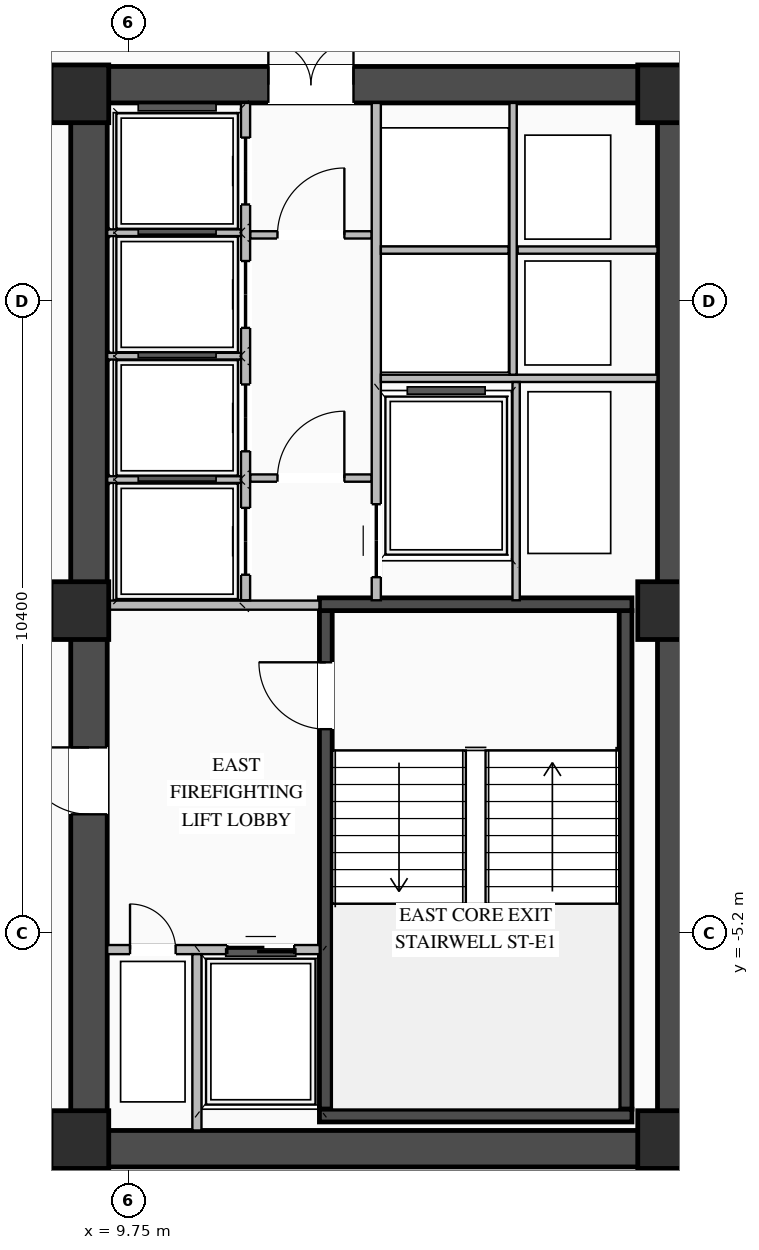
"""IFC4 building model, lengths in metres.
Left out: names, types, materials, properties, quantities, classifications, styles, units other than length and angle.
Written with IfcOpenShell. Run it as: python <this file> out.ifc"""

import sys

from ifc_helpers import new_model, si_unit, direction, frame, frame_2d, origin, origin_2d, place, context, subcontext, project, spatial, rectangle, extrude, element, fill, save


model = new_model("IFC4")
c1 = context("Model", 3, precision=1e-05, world=origin(), true_north=direction((0.0, 1.0)))
c2 = subcontext(c1, "Body", "Model", "MODEL_VIEW")
j1 = project(units=[si_unit("LENGTHUNIT", "METRE"), si_unit("PLANEANGLEUNIT", "RADIAN")], contexts=[c1])
p1 = place(None, origin())
s1 = spatial("IfcSite", under=j1, at=p1, CompositionType="ELEMENT")
p2 = place(p1, origin())
s2 = spatial("IfcBuilding", under=s1, at=p2, CompositionType="ELEMENT")
p3 = place(p2, frame((0.0, 0.0, 141.55)))
s3 = spatial("IfcBuildingStorey", under=s2, at=p3, CompositionType="ELEMENT", Elevation=141.55)
p4 = place(p3, frame((8.8, -8.75, 0.0), z_axis=(0.0, 0.0, 1.0), x_axis=(1.0, 0.0, 0.0)))
e1 = element("IfcWall", 1, at=p4, inside=s3, PredefinedType="SHEAR", context=c2, shape_type="SweptSolid", body=[
    extrude(rectangle(XDim=10.25, YDim=0.6, at=frame_2d((5.125, 0.0))), origin(), (0.0, 0.0, 1.0), 3.27),
])
p5 = place(p3, frame((8.8, 8.75, 0.0), z_axis=(0.0, 0.0, 1.0), x_axis=(1.0, 0.0, 0.0)))
e2 = element("IfcWall", 2, at=p5, inside=s3, PredefinedType="SHEAR", context=c2, shape_type="SweptSolid", body=[
    extrude(rectangle(XDim=10.25, YDim=0.6, at=frame_2d((5.125, 0.0))), origin(), (0.0, 0.0, 1.0), 3.27),
])
p6 = place(p5, frame((3.25, 0.0, 0.0)))
e3 = element("IfcOpeningElement", 3, at=p6, cuts=e2, PredefinedType="OPENING", context=c2, shape_type="SweptSolid", body=[
    extrude(rectangle(XDim=1.4, YDim=2.05, at=frame_2d((0.7, 1.025))), frame((0.0, 0.31, 0.0), z_axis=(0.0, -1.0, 0.0), x_axis=(1.0, 0.0, 0.0)), (0.0, 0.0, 1.0), 0.62),
])
p7 = place(p3, frame((9.1, -8.45, 0.0), z_axis=(0.0, 0.0, 1.0), x_axis=(0.0, 1.0, 0.0)))
e4 = element("IfcWall", 4, at=p7, inside=s3, PredefinedType="SHEAR", context=c2, shape_type="SweptSolid", body=[
    extrude(rectangle(XDim=16.9, YDim=0.6, at=frame_2d((8.45, 0.0))), origin(), (0.0, 0.0, 1.0), 3.27),
])
p8 = place(p7, frame((5.2, 0.0, 0.0)))
e5 = element("IfcOpeningElement", 5, at=p8, cuts=e4, PredefinedType="OPENING", context=c2, shape_type="SweptSolid", body=[
    extrude(rectangle(XDim=1.1, YDim=2.08, at=frame_2d((0.55, 1.04))), frame((0.0, 0.31, 0.0), z_axis=(0.0, -1.0, 0.0), x_axis=(1.0, 0.0, 0.0)), (0.0, 0.0, 1.0), 0.62),
])
p9 = place(p3, frame((18.75, -8.45, 0.0), z_axis=(0.0, 0.0, 1.0), x_axis=(0.0, 1.0, 0.0)))
e6 = element("IfcWall", 6, at=p9, inside=s3, PredefinedType="SHEAR", context=c2, shape_type="SweptSolid", body=[
    extrude(rectangle(XDim=16.9, YDim=0.6, at=frame_2d((8.45, 0.0))), origin(), (0.0, 0.0, 1.0), 3.27),
])
p10 = place(p3, frame((12.995, -8.1, 0.0), z_axis=(0.0, 0.0, 1.0), x_axis=(0.0, 1.0, 0.0)))
e7 = element("IfcWall", 7, at=p10, inside=s3, PredefinedType="SHEAR", context=c2, shape_type="SweptSolid", body=[
    extrude(rectangle(XDim=8.2, YDim=0.21, at=frame_2d((4.1, 0.0))), origin(), (0.0, 0.0, 1.0), 3.27),
])
p11 = place(p10, frame((6.25, 0.0, 0.0)))
e8 = element("IfcOpeningElement", 8, at=p11, cuts=e7, PredefinedType="OPENING", context=c2, shape_type="SweptSolid", body=[
    extrude(rectangle(XDim=1.1, YDim=2.15, at=frame_2d((0.55, 1.075))), frame((0.0, 0.115, 0.0), z_axis=(0.0, -1.0, 0.0), x_axis=(1.0, 0.0, 0.0)), (0.0, 0.0, 1.0), 0.23),
])
p12 = place(p3, frame((17.925, -8.1, 0.0), z_axis=(0.0, 0.0, 1.0), x_axis=(0.0, 1.0, 0.0)))
e9 = element("IfcWall", 9, at=p12, inside=s3, PredefinedType="SHEAR", context=c2, shape_type="SweptSolid", body=[
    extrude(rectangle(XDim=8.2, YDim=0.21, at=frame_2d((4.1, 0.0))), origin(), (0.0, 0.0, 1.0), 3.27),
])
for number, where, z_axis, x_axis in (
    (10, (12.89, -8.205, 0.0), (0.0, 0.0, 1.0), (1.0, 0.0, 0.0)),
    (11, (18.03, 0.205, 0.0), (0.0, 0.0, 1.0), (-1.0, 0.0, 0.0)),
):
    element("IfcWall", number, at=place(p3, frame(where, z_axis=z_axis, x_axis=x_axis)), inside=s3, PredefinedType="SHEAR", context=c2, shape_type="SweptSolid", body=[
        extrude(rectangle(XDim=5.14, YDim=0.21, at=frame_2d((2.57, 0.0))), origin(), (0.0, 0.0, 1.0), 3.27),
    ])
for number, where, z_axis, x_axis in (
    (12, (8.95, -8.6, 0.0), (0.0, 0.0, 1.0), (1.0, 0.0, 0.0)),
    (13, (8.95, 0.1, 0.0), (0.0, 0.0, 1.0), (1.0, 0.0, 0.0)),
    (14, (8.95, 8.6, 0.0), (0.0, 0.0, 1.0), (1.0, 0.0, 0.0)),
    (15, (18.6, -8.6, 0.0), (0.0, 0.0, 1.0), (1.0, 0.0, 0.0)),
    (16, (18.6, 0.1, 0.0), (0.0, 0.0, 1.0), (1.0, 0.0, 0.0)),
    (17, (18.6, 8.6, 0.0), (0.0, 0.0, 1.0), (1.0, 0.0, 0.0)),
):
    element("IfcColumn", number, at=place(p3, frame(where, z_axis=z_axis, x_axis=x_axis)), inside=s3, PredefinedType="COLUMN", context=c2, shape_type="SweptSolid", body=[
        extrude(rectangle(XDim=0.95, YDim=0.95, at=origin_2d()), origin(), (0.0, 0.0, 1.0), 3.45),
    ])
p13 = place(p3, frame((9.4, -5.475, 0.0), z_axis=(0.0, 0.0, 1.0), x_axis=(1.0, 0.0, 0.0)))
e18 = element("IfcWall", 18, at=p13, inside=s3, PredefinedType="STANDARD", context=c2, shape_type="SweptSolid", body=[
    extrude(rectangle(XDim=3.495, YDim=0.15, at=frame_2d((1.748, 0.0))), origin(), (0.0, 0.0, 1.0), 3.25),
])
p14 = place(p13, frame((1.975, 0.0, 0.0)))
e19 = element("IfcOpeningElement", 19, at=p14, cuts=e18, PredefinedType="OPENING", context=c2, shape_type="SweptSolid", body=[
    extrude(rectangle(XDim=1.1, YDim=2.15, at=frame_2d((0.55, 1.075))), frame((0.0, 0.085, 0.0), z_axis=(0.0, -1.0, 0.0), x_axis=(1.0, 0.0, 0.0)), (0.0, 0.0, 1.0), 0.17),
])
p15 = place(p13, frame((0.375, 0.0, 0.0)))
e20 = element("IfcOpeningElement", 20, at=p15, cuts=e18, PredefinedType="OPENING", context=c2, shape_type="SweptSolid", body=[
    extrude(rectangle(XDim=0.75, YDim=2.05, at=frame_2d((0.375, 1.025))), frame((0.0, 0.085, 0.0), z_axis=(0.0, -1.0, 0.0), x_axis=(1.0, 0.0, 0.0)), (0.0, 0.0, 1.0), 0.17),
])
p16 = place(p3, frame((10.875, -8.45, 0.0), z_axis=(0.0, 0.0, 1.0), x_axis=(0.0, 1.0, 0.0)))
e21 = element("IfcWall", 21, at=p16, inside=s3, PredefinedType="STANDARD", context=c2, shape_type="SweptSolid", body=[
    extrude(rectangle(XDim=2.9, YDim=0.15, at=frame_2d((1.45, 0.0))), origin(), (0.0, 0.0, 1.0), 3.25),
])
p17 = place(p3, frame((9.4, 0.19, 0.0), z_axis=(0.0, 0.0, 1.0), x_axis=(1.0, 0.0, 0.0)))
e22 = element("IfcWall", 22, at=p17, inside=s3, PredefinedType="STANDARD", context=c2, shape_type="SweptSolid", body=[
    extrude(rectangle(XDim=3.49, YDim=0.15, at=frame_2d((1.745, 0.0))), origin(), (0.0, 0.0, 1.0), 2.645),
])
p18 = place(p3, frame((11.75, 2.28, 0.0), z_axis=(0.0, 0.0, 1.0), x_axis=(1.0, 0.0, 0.0)))
e23 = element("IfcWall", 23, at=p18, inside=s3, PredefinedType="STANDARD", context=c2, shape_type="SweptSolid", body=[
    extrude(rectangle(XDim=2.0, YDim=0.12, at=frame_2d((1.0, 0.0))), origin(), (0.0, 0.0, 1.0), 3.25),
])
p19 = place(p18, frame((0.45, 0.0, 0.0)))
e24 = element("IfcOpeningElement", 24, at=p19, cuts=e23, PredefinedType="OPENING", context=c2, shape_type="SweptSolid", body=[
    extrude(rectangle(XDim=1.1, YDim=2.1, at=frame_2d((0.55, 1.05))), frame((0.0, 0.07, 0.0), z_axis=(0.0, -1.0, 0.0), x_axis=(1.0, 0.0, 0.0)), (0.0, 0.0, 1.0), 0.14),
])
p20 = place(p3, frame((11.75, 6.28, 0.0), z_axis=(0.0, 0.0, 1.0), x_axis=(1.0, 0.0, 0.0)))
e25 = element("IfcWall", 25, at=p20, inside=s3, PredefinedType="STANDARD", context=c2, shape_type="SweptSolid", body=[
    extrude(rectangle(XDim=2.0, YDim=0.12, at=frame_2d((1.0, 0.0))), origin(), (0.0, 0.0, 1.0), 3.25),
])
p21 = place(p20, frame((0.45, 0.0, 0.0)))
e26 = element("IfcOpeningElement", 26, at=p21, cuts=e25, PredefinedType="OPENING", context=c2, shape_type="SweptSolid", body=[
    extrude(rectangle(XDim=1.1, YDim=2.1, at=frame_2d((0.55, 1.05))), frame((0.0, 0.07, 0.0), z_axis=(0.0, -1.0, 0.0), x_axis=(1.0, 0.0, 0.0)), (0.0, 0.0, 1.0), 0.14),
])
p22 = place(p3, frame((11.675, 0.27, 0.0), z_axis=(0.0, 0.0, 1.0), x_axis=(0.0, 1.0, 0.0)))
e27 = element("IfcWall", 27, at=p22, inside=s3, PredefinedType="STANDARD", context=c2, shape_type="SweptSolid", body=[
    extrude(rectangle(XDim=8.18, YDim=0.15, at=frame_2d((4.09, 0.0))), origin(), (0.0, 0.0, 1.0), 3.25),
])
p23 = place(p22, frame((0.42, 0.0, 0.0)))
e28 = element("IfcOpeningElement", 28, at=p23, cuts=e27, PredefinedType="OPENING", context=c2, shape_type="SweptSolid", body=[
    extrude(rectangle(XDim=1.1, YDim=2.1, at=frame_2d((0.55, 1.05))), frame((0.0, 0.085, 0.0), z_axis=(0.0, -1.0, 0.0), x_axis=(1.0, 0.0, 0.0)), (0.0, 0.0, 1.0), 0.17),
])
p24 = place(p22, frame((2.45, 0.0, 0.0)))
e29 = element("IfcOpeningElement", 29, at=p24, cuts=e27, PredefinedType="OPENING", context=c2, shape_type="SweptSolid", body=[
    extrude(rectangle(XDim=1.1, YDim=2.1, at=frame_2d((0.55, 1.05))), frame((0.0, 0.085, 0.0), z_axis=(0.0, -1.0, 0.0), x_axis=(1.0, 0.0, 0.0)), (0.0, 0.0, 1.0), 0.17),
])
p25 = place(p22, frame((4.48, 0.0, 0.0)))
e30 = element("IfcOpeningElement", 30, at=p25, cuts=e27, PredefinedType="OPENING", context=c2, shape_type="SweptSolid", body=[
    extrude(rectangle(XDim=1.1, YDim=2.1, at=frame_2d((0.55, 1.05))), frame((0.0, 0.085, 0.0), z_axis=(0.0, -1.0, 0.0), x_axis=(1.0, 0.0, 0.0)), (0.0, 0.0, 1.0), 0.17),
])
p26 = place(p22, frame((6.51, 0.0, 0.0)))
e31 = element("IfcOpeningElement", 31, at=p26, cuts=e27, PredefinedType="OPENING", context=c2, shape_type="SweptSolid", body=[
    extrude(rectangle(XDim=1.1, YDim=2.1, at=frame_2d((0.55, 1.05))), frame((0.0, 0.085, 0.0), z_axis=(0.0, -1.0, 0.0), x_axis=(1.0, 0.0, 0.0)), (0.0, 0.0, 1.0), 0.17),
])
for number, where, z_axis, x_axis in (
    (32, (9.4, 2.255, 0.0), (0.0, 0.0, 1.0), (1.0, 0.0, 0.0)),
    (33, (9.4, 4.285, 0.0), (0.0, 0.0, 1.0), (1.0, 0.0, 0.0)),
    (34, (9.4, 6.315, 0.0), (0.0, 0.0, 1.0), (1.0, 0.0, 0.0)),
):
    element("IfcWall", number, at=place(p3, frame(where, z_axis=z_axis, x_axis=x_axis)), inside=s3, PredefinedType="STANDARD", context=c2, shape_type="SweptSolid", body=[
        extrude(rectangle(XDim=2.2, YDim=0.11, at=frame_2d((1.1, 0.0))), origin(), (0.0, 0.0, 1.0), 3.25),
    ])
p27 = place(p3, frame((13.825, 0.27, 0.0), z_axis=(0.0, 0.0, 1.0), x_axis=(0.0, 1.0, 0.0)))
e35 = element("IfcWall", 35, at=p27, inside=s3, PredefinedType="STANDARD", context=c2, shape_type="SweptSolid", body=[
    extrude(rectangle(XDim=8.18, YDim=0.15, at=frame_2d((4.09, 0.0))), origin(), (0.0, 0.0, 1.0), 3.25),
])
p28 = place(p27, frame((0.38, 0.0, 0.0)))
e36 = element("IfcOpeningElement", 36, at=p28, cuts=e35, PredefinedType="OPENING", context=c2, shape_type="SweptSolid", body=[
    extrude(rectangle(XDim=1.2, YDim=2.1, at=frame_2d((0.6, 1.05))), frame((0.0, 0.085, 0.0), z_axis=(0.0, -1.0, 0.0), x_axis=(1.0, 0.0, 0.0)), (0.0, 0.0, 1.0), 0.17),
])
p29 = place(p3, frame((13.9, 3.92, 0.0), z_axis=(0.0, 0.0, 1.0), x_axis=(1.0, 0.0, 0.0)))
e37 = element("IfcWall", 37, at=p29, inside=s3, PredefinedType="STANDARD", context=c2, shape_type="SweptSolid", body=[
    extrude(rectangle(XDim=4.55, YDim=0.12, at=frame_2d((2.275, 0.0))), origin(), (0.0, 0.0, 1.0), 3.25),
])
p30 = place(p3, frame((16.15, 6.03, 0.0), z_axis=(0.0, 0.0, 1.0), x_axis=(1.0, 0.0, 0.0)))
e38 = element("IfcWall", 38, at=p30, inside=s3, PredefinedType="STANDARD", context=c2, shape_type="SweptSolid", body=[
    extrude(rectangle(XDim=2.3, YDim=0.12, at=frame_2d((1.15, 0.0))), origin(), (0.0, 0.0, 1.0), 3.25),
])
p31 = place(p3, frame((16.075, 3.98, 0.0), z_axis=(0.0, 0.0, 1.0), x_axis=(0.0, 1.0, 0.0)))
e39 = element("IfcWall", 39, at=p31, inside=s3, PredefinedType="STANDARD", context=c2, shape_type="SweptSolid", body=[
    extrude(rectangle(XDim=4.47, YDim=0.12, at=frame_2d((2.235, 0.0))), origin(), (0.0, 0.0, 1.0), 3.25),
])
p32 = place(p3, frame((13.9, 6.03, 0.0), z_axis=(0.0, 0.0, 1.0), x_axis=(1.0, 0.0, 0.0)))
e40 = element("IfcWall", 40, at=p32, inside=s3, PredefinedType="STANDARD", context=c2, shape_type="SweptSolid", body=[
    extrude(rectangle(XDim=2.1, YDim=0.12, at=frame_2d((1.05, 0.0))), origin(), (0.0, 0.0, 1.0), 3.25),
])
p33 = place(p3, frame((16.125, 0.27, 0.0), z_axis=(0.0, 0.0, 1.0), x_axis=(0.0, 1.0, 0.0)))
e41 = element("IfcWall", 41, at=p33, inside=s3, PredefinedType="STANDARD", context=c2, shape_type="SweptSolid", body=[
    extrude(rectangle(XDim=3.59, YDim=0.12, at=frame_2d((1.795, 0.0))), origin(), (0.0, 0.0, 1.0), 3.25),
])
p34 = place(p11, origin())
e42 = element("IfcDoor", 42, at=p34, inside=s3, OperationType="SINGLE_SWING_RIGHT", PredefinedType="DOOR", context=c2, shape_type="SweptSolid", body=[
    extrude(rectangle(XDim=1.1, YDim=2.15, at=frame_2d((0.55, 1.075))), frame((0.0, 0.025, 0.0), z_axis=(0.0, -1.0, 0.0), x_axis=(1.0, 0.0, 0.0)), (0.0, 0.0, 1.0), 0.05),
])
fill(e8, e42)
p35 = place(p14, origin())
e43 = element("IfcDoor", 43, at=p35, inside=s3, OperationType="DOUBLE_DOOR_SLIDING", PredefinedType="DOOR", context=c2, shape_type="SweptSolid", body=[
    extrude(rectangle(XDim=1.1, YDim=2.15, at=frame_2d((0.55, 1.075))), frame((0.0, 0.025, 0.0), z_axis=(0.0, -1.0, 0.0), x_axis=(1.0, 0.0, 0.0)), (0.0, 0.0, 1.0), 0.05),
])
fill(e19, e43)
p36 = place(p15, origin())
e44 = element("IfcDoor", 44, at=p36, inside=s3, OperationType="SINGLE_SWING_LEFT", PredefinedType="DOOR", context=c2, shape_type="SweptSolid", body=[
    extrude(rectangle(XDim=0.75, YDim=2.05, at=frame_2d((0.375, 1.025))), frame((0.0, 0.025, 0.0), z_axis=(0.0, -1.0, 0.0), x_axis=(1.0, 0.0, 0.0)), (0.0, 0.0, 1.0), 0.05),
])
fill(e20, e44)
p37 = place(p8, origin())
e45 = element("IfcDoor", 45, at=p37, inside=s3, OperationType="SINGLE_SWING_RIGHT", PredefinedType="DOOR", context=c2, shape_type="SweptSolid", body=[
    extrude(rectangle(XDim=1.1, YDim=2.08, at=frame_2d((0.55, 1.04))), frame((0.0, -0.205, 0.0), z_axis=(0.0, -1.0, 0.0), x_axis=(1.0, 0.0, 0.0)), (0.0, 0.0, 1.0), 0.05),
])
fill(e5, e45)
p38 = place(p19, origin())
e46 = element("IfcDoor", 46, at=p38, inside=s3, OperationType="SINGLE_SWING_RIGHT", PredefinedType="DOOR", context=c2, shape_type="SweptSolid", body=[
    extrude(rectangle(XDim=1.1, YDim=2.1, at=frame_2d((0.55, 1.05))), frame((0.0, 0.025, 0.0), z_axis=(0.0, -1.0, 0.0), x_axis=(1.0, 0.0, 0.0)), (0.0, 0.0, 1.0), 0.05),
])
fill(e24, e46)
p39 = place(p21, origin())
e47 = element("IfcDoor", 47, at=p39, inside=s3, OperationType="SINGLE_SWING_RIGHT", PredefinedType="DOOR", context=c2, shape_type="SweptSolid", body=[
    extrude(rectangle(XDim=1.1, YDim=2.1, at=frame_2d((0.55, 1.05))), frame((0.0, 0.025, 0.0), z_axis=(0.0, -1.0, 0.0), x_axis=(1.0, 0.0, 0.0)), (0.0, 0.0, 1.0), 0.05),
])
fill(e26, e47)
p40 = place(p6, origin())
e48 = element("IfcDoor", 48, at=p40, inside=s3, OperationType="DOUBLE_DOOR_SINGLE_SWING", PredefinedType="DOOR", context=c2, shape_type="SweptSolid", body=[
    extrude(rectangle(XDim=1.4, YDim=2.05, at=frame_2d((0.7, 1.025))), frame((0.0, 0.245, 0.0), z_axis=(0.0, -1.0, 0.0), x_axis=(1.0, 0.0, 0.0)), (0.0, 0.0, 1.0), 0.05),
])
fill(e3, e48)
p41 = place(p23, origin())
e49 = element("IfcDoor", 49, at=p41, inside=s3, OperationType="DOUBLE_DOOR_SLIDING", PredefinedType="DOOR", context=c2, shape_type="SweptSolid", body=[
    extrude(rectangle(XDim=1.1, YDim=2.1, at=frame_2d((0.55, 1.05))), frame((0.0, 0.025, 0.0), z_axis=(0.0, -1.0, 0.0), x_axis=(1.0, 0.0, 0.0)), (0.0, 0.0, 1.0), 0.05),
])
fill(e28, e49)
p42 = place(p24, origin())
e50 = element("IfcDoor", 50, at=p42, inside=s3, OperationType="DOUBLE_DOOR_SLIDING", PredefinedType="DOOR", context=c2, shape_type="SweptSolid", body=[
    extrude(rectangle(XDim=1.1, YDim=2.1, at=frame_2d((0.55, 1.05))), frame((0.0, 0.025, 0.0), z_axis=(0.0, -1.0, 0.0), x_axis=(1.0, 0.0, 0.0)), (0.0, 0.0, 1.0), 0.05),
])
fill(e29, e50)
p43 = place(p25, origin())
e51 = element("IfcDoor", 51, at=p43, inside=s3, OperationType="DOUBLE_DOOR_SLIDING", PredefinedType="DOOR", context=c2, shape_type="SweptSolid", body=[
    extrude(rectangle(XDim=1.1, YDim=2.1, at=frame_2d((0.55, 1.05))), frame((0.0, 0.025, 0.0), z_axis=(0.0, -1.0, 0.0), x_axis=(1.0, 0.0, 0.0)), (0.0, 0.0, 1.0), 0.05),
])
fill(e30, e51)
p44 = place(p26, origin())
e52 = element("IfcDoor", 52, at=p44, inside=s3, OperationType="DOUBLE_DOOR_SLIDING", PredefinedType="DOOR", context=c2, shape_type="SweptSolid", body=[
    extrude(rectangle(XDim=1.1, YDim=2.1, at=frame_2d((0.55, 1.05))), frame((0.0, 0.025, 0.0), z_axis=(0.0, -1.0, 0.0), x_axis=(1.0, 0.0, 0.0)), (0.0, 0.0, 1.0), 0.05),
])
fill(e31, e52)
p45 = place(p28, origin())
e53 = element("IfcDoor", 53, at=p45, inside=s3, OperationType="DOUBLE_DOOR_SLIDING", PredefinedType="DOOR", context=c2, shape_type="SweptSolid", body=[
    extrude(rectangle(XDim=1.2, YDim=2.1, at=frame_2d((0.6, 1.05))), frame((0.0, 0.025, 0.0), z_axis=(0.0, -1.0, 0.0), x_axis=(1.0, 0.0, 0.0)), (0.0, 0.0, 1.0), 0.05),
])
fill(e36, e53)
save(model, sys.argv[1])
